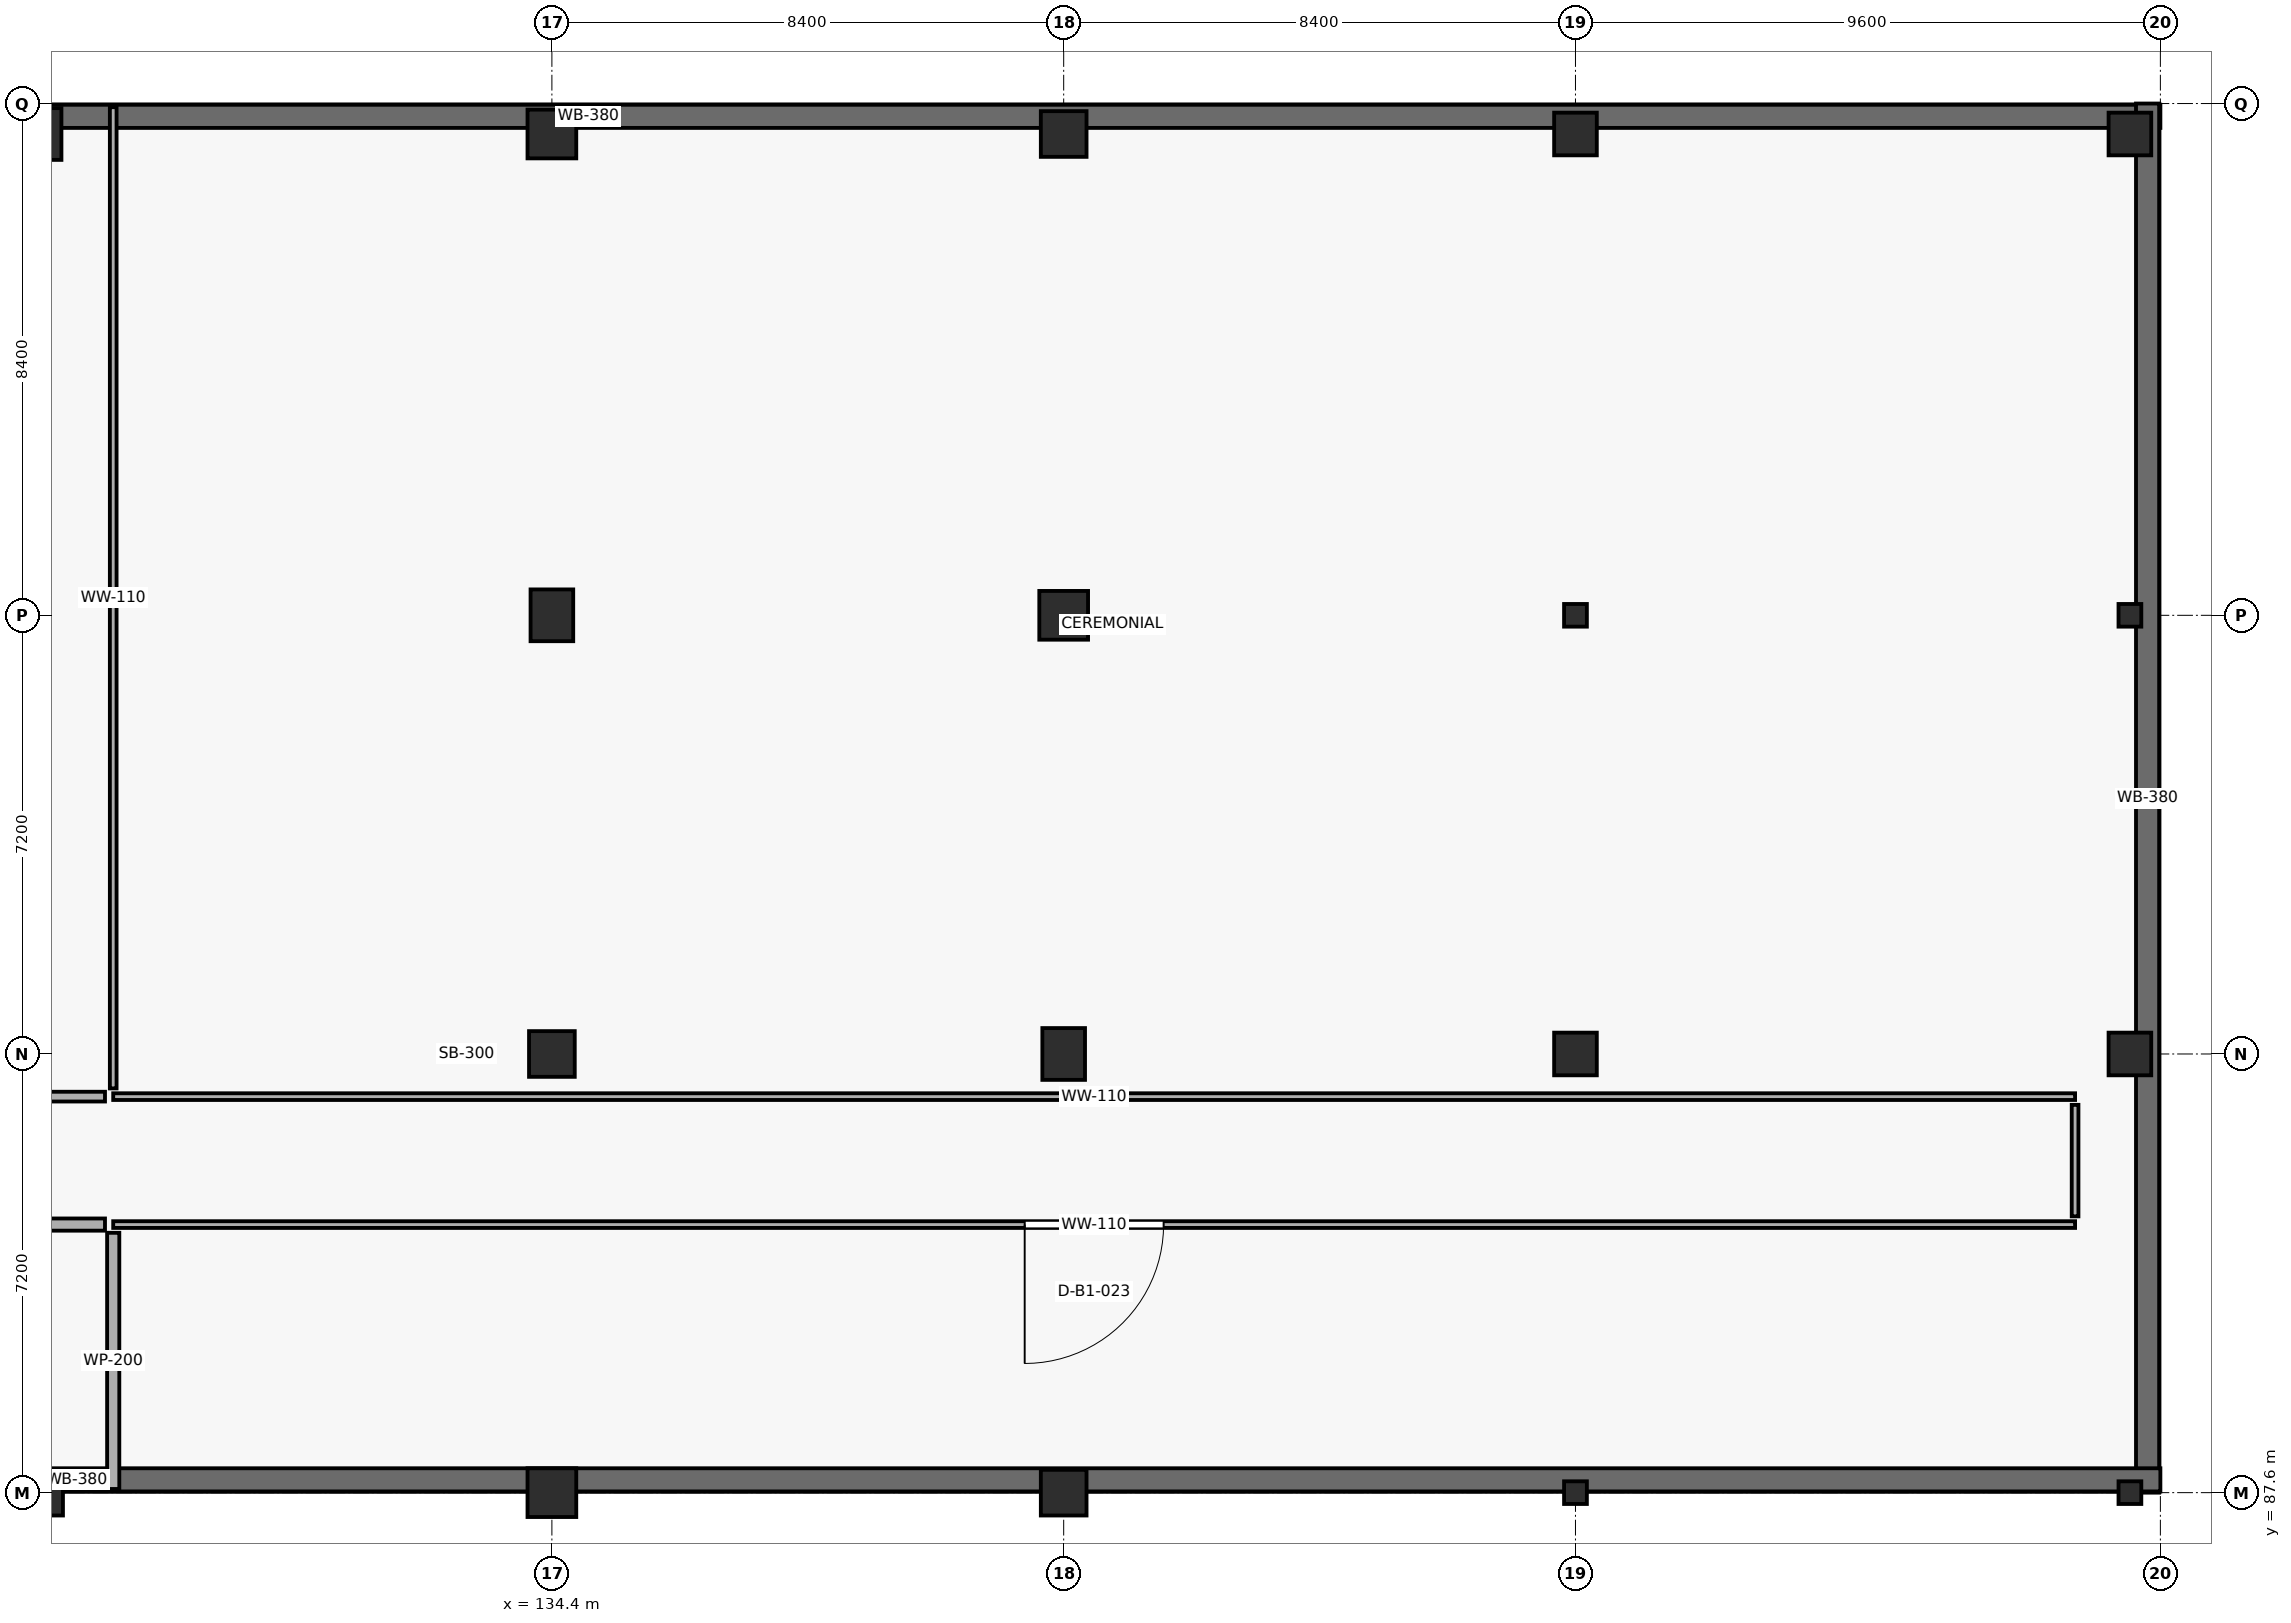
"""IFC4 building model, lengths in metres.
Left out: names, types, materials, properties, quantities, classifications, styles, units other than length and angle.
Written with IfcOpenShell. Run it as: python <this file> out.ifc"""

import sys

from ifc_helpers import new_model, si_unit, direction, frame, frame_2d, origin, origin_2d, place, context, subcontext, project, spatial, rectangle, i_section, extrude, element, fill, save


model = new_model("IFC4")
c1 = context("Model", 3, precision=1e-05, world=origin(), true_north=direction((0.0, 1.0)))
c2 = subcontext(c1, "Body", "Model", "MODEL_VIEW")
j1 = project(units=[si_unit("LENGTHUNIT", "METRE"), si_unit("PLANEANGLEUNIT", "RADIAN")], contexts=[c1])
p1 = place(None, origin())
s1 = spatial("IfcSite", under=j1, at=p1, CompositionType="ELEMENT")
p2 = place(p1, origin())
s2 = spatial("IfcBuilding", under=s1, at=p2, CompositionType="ELEMENT")
p3 = place(p2, frame((0.0, 0.0, -4.5)))
s3 = spatial("IfcBuildingStorey", under=s2, at=p3, CompositionType="ELEMENT", Elevation=-4.5)
p4 = place(p3, frame((126.0, 87.6, -0.3), z_axis=(0.0, 0.0, 1.0), x_axis=(1.0, 0.0, 0.0)))
e1 = element("IfcColumn", 1, at=p4, inside=s3, PredefinedType="COLUMN", context=c2, shape_type="SweptSolid", body=[
    extrude(rectangle(XDim=0.75, YDim=0.75, at=origin_2d()), origin(), (0.0, 0.0, 1.0), 4.8),
])
p5 = place(p3, frame((126.0, 109.9, -0.3), z_axis=(0.0, 0.0, 1.0), x_axis=(1.0, 0.0, 0.0)))
e2 = element("IfcColumn", 2, at=p5, inside=s3, PredefinedType="COLUMN", context=c2, shape_type="SweptSolid", body=[
    extrude(rectangle(XDim=0.7, YDim=0.85, at=origin_2d()), origin(), (0.0, 0.0, 1.0), 4.8),
])
p6 = place(p3, frame((134.4, 87.6, -0.3), z_axis=(0.0, 0.0, 1.0), x_axis=(1.0, 0.0, 0.0)))
e3 = element("IfcColumn", 3, at=p6, inside=s3, PredefinedType="COLUMN", context=c2, shape_type="SweptSolid", body=[
    extrude(rectangle(XDim=0.8, YDim=0.8, at=origin_2d()), origin(), (0.0, 0.0, 1.0), 4.8),
])
p7 = place(p3, frame((134.4, 94.8, -0.3), z_axis=(0.0, 0.0, 1.0), x_axis=(1.0, 0.0, 0.0)))
e4 = element("IfcColumn", 4, at=p7, inside=s3, PredefinedType="COLUMN", context=c2, shape_type="SweptSolid", body=[
    extrude(rectangle(XDim=0.75, YDim=0.75, at=origin_2d()), origin(), (0.0, 0.0, 1.0), 4.8),
])
p8 = place(p3, frame((134.4, 102.0, -0.3), z_axis=(0.0, 0.0, 1.0), x_axis=(1.0, 0.0, 0.0)))
e5 = element("IfcColumn", 5, at=p8, inside=s3, PredefinedType="COLUMN", context=c2, shape_type="SweptSolid", body=[
    extrude(rectangle(XDim=0.7, YDim=0.85, at=origin_2d()), origin(), (0.0, 0.0, 1.0), 4.8),
])
p9 = place(p3, frame((134.4, 109.9, -0.3), z_axis=(0.0, 0.0, 1.0), x_axis=(1.0, 0.0, 0.0)))
e6 = element("IfcColumn", 6, at=p9, inside=s3, PredefinedType="COLUMN", context=c2, shape_type="SweptSolid", body=[
    extrude(rectangle(XDim=0.8, YDim=0.8, at=origin_2d()), origin(), (0.0, 0.0, 1.0), 4.8),
])
p10 = place(p3, frame((142.8, 87.6, -0.3), z_axis=(0.0, 0.0, 1.0), x_axis=(1.0, 0.0, 0.0)))
e7 = element("IfcColumn", 7, at=p10, inside=s3, PredefinedType="COLUMN", context=c2, shape_type="SweptSolid", body=[
    extrude(rectangle(XDim=0.75, YDim=0.75, at=origin_2d()), origin(), (0.0, 0.0, 1.0), 4.8),
])
p11 = place(p3, frame((142.8, 94.8, -0.3), z_axis=(0.0, 0.0, 1.0), x_axis=(1.0, 0.0, 0.0)))
e8 = element("IfcColumn", 8, at=p11, inside=s3, PredefinedType="COLUMN", context=c2, shape_type="SweptSolid", body=[
    extrude(rectangle(XDim=0.7, YDim=0.85, at=origin_2d()), origin(), (0.0, 0.0, 1.0), 4.8),
])
p12 = place(p3, frame((142.8, 102.0, -0.3), z_axis=(0.0, 0.0, 1.0), x_axis=(1.0, 0.0, 0.0)))
e9 = element("IfcColumn", 9, at=p12, inside=s3, PredefinedType="COLUMN", context=c2, shape_type="SweptSolid", body=[
    extrude(rectangle(XDim=0.8, YDim=0.8, at=origin_2d()), origin(), (0.0, 0.0, 1.0), 4.8),
])
p13 = place(p3, frame((142.8, 109.9, -0.3), z_axis=(0.0, 0.0, 1.0), x_axis=(1.0, 0.0, 0.0)))
e10 = element("IfcColumn", 10, at=p13, inside=s3, PredefinedType="COLUMN", context=c2, shape_type="SweptSolid", body=[
    extrude(rectangle(XDim=0.75, YDim=0.75, at=origin_2d()), origin(), (0.0, 0.0, 1.0), 4.8),
])
p14 = place(p3, frame((151.2, 87.6, -0.3), z_axis=(0.0, 0.0, 1.0), x_axis=(1.0, 0.0, 0.0)))
e11 = element("IfcColumn", 11, at=p14, inside=s3, PredefinedType="COLUMN", context=c2, shape_type="SweptSolid", body=[
    extrude(i_section(OverallWidth=0.374, OverallDepth=0.372, WebThickness=0.016, FlangeThickness=0.026, at=origin_2d()), origin(), (0.0, 0.0, 1.0), 4.8),
])
p15 = place(p3, frame((151.2, 94.8, -0.3), z_axis=(0.0, 0.0, 1.0), x_axis=(1.0, 0.0, 0.0)))
e12 = element("IfcColumn", 12, at=p15, inside=s3, PredefinedType="COLUMN", context=c2, shape_type="SweptSolid", body=[
    extrude(rectangle(XDim=0.7, YDim=0.7, at=origin_2d()), origin(), (0.0, 0.0, 1.0), 4.8),
])
p16 = place(p3, frame((151.2, 102.0, -0.3), z_axis=(0.0, 0.0, 1.0), x_axis=(1.0, 0.0, 0.0)))
e13 = element("IfcColumn", 13, at=p16, inside=s3, PredefinedType="COLUMN", context=c2, shape_type="SweptSolid", body=[
    extrude(i_section(OverallWidth=0.374, OverallDepth=0.372, WebThickness=0.016, FlangeThickness=0.026, at=origin_2d()), origin(), (0.0, 0.0, 1.0), 4.8),
])
p17 = place(p3, frame((151.2, 109.9, -0.3), z_axis=(0.0, 0.0, 1.0), x_axis=(1.0, 0.0, 0.0)))
e14 = element("IfcColumn", 14, at=p17, inside=s3, PredefinedType="COLUMN", context=c2, shape_type="SweptSolid", body=[
    extrude(rectangle(XDim=0.7, YDim=0.7, at=origin_2d()), origin(), (0.0, 0.0, 1.0), 4.8),
])
p18 = place(p3, frame((160.3, 87.6, -0.3), z_axis=(0.0, 0.0, 1.0), x_axis=(1.0, 0.0, 0.0)))
e15 = element("IfcColumn", 15, at=p18, inside=s3, PredefinedType="COLUMN", context=c2, shape_type="SweptSolid", body=[
    extrude(i_section(OverallWidth=0.374, OverallDepth=0.372, WebThickness=0.016, FlangeThickness=0.026, at=origin_2d()), origin(), (0.0, 0.0, 1.0), 4.8),
])
p19 = place(p3, frame((160.3, 94.8, -0.3), z_axis=(0.0, 0.0, 1.0), x_axis=(1.0, 0.0, 0.0)))
e16 = element("IfcColumn", 16, at=p19, inside=s3, PredefinedType="COLUMN", context=c2, shape_type="SweptSolid", body=[
    extrude(rectangle(XDim=0.7, YDim=0.7, at=origin_2d()), origin(), (0.0, 0.0, 1.0), 4.8),
])
p20 = place(p3, frame((160.3, 102.0, -0.3), z_axis=(0.0, 0.0, 1.0), x_axis=(1.0, 0.0, 0.0)))
e17 = element("IfcColumn", 17, at=p20, inside=s3, PredefinedType="COLUMN", context=c2, shape_type="SweptSolid", body=[
    extrude(i_section(OverallWidth=0.374, OverallDepth=0.372, WebThickness=0.016, FlangeThickness=0.026, at=origin_2d()), origin(), (0.0, 0.0, 1.0), 4.8),
])
p21 = place(p3, frame((160.3, 109.9, -0.3), z_axis=(0.0, 0.0, 1.0), x_axis=(1.0, 0.0, 0.0)))
e18 = element("IfcColumn", 18, at=p21, inside=s3, PredefinedType="COLUMN", context=c2, shape_type="SweptSolid", body=[
    extrude(rectangle(XDim=0.7, YDim=0.7, at=origin_2d()), origin(), (0.0, 0.0, 1.0), 4.8),
])
p22 = place(p3, frame((109.2, 110.19, 0.0), z_axis=(0.0, 0.0, 1.0), x_axis=(1.0, 0.0, 0.0)))
e19 = element("IfcWall", 19, at=p22, inside=s3, PredefinedType="SOLIDWALL", context=c2, shape_type="SweptSolid", body=[
    extrude(rectangle(XDim=51.6, YDim=0.38, at=frame_2d((25.8, 0.0))), origin(), (0.0, 0.0, 1.0), 4.22),
])
p23 = place(p3, frame((160.59, 110.4, 0.0), z_axis=(0.0, 0.0, 1.0), x_axis=(0.0, -1.0, 0.0)))
e20 = element("IfcWall", 20, at=p23, inside=s3, PredefinedType="SOLIDWALL", context=c2, shape_type="SweptSolid", body=[
    extrude(rectangle(XDim=22.8, YDim=0.38, at=frame_2d((11.4, 0.0))), origin(), (0.0, 0.0, 1.0), 4.22),
])
p24 = place(p3, frame((160.8, 87.81, 0.0), z_axis=(0.0, 0.0, 1.0), x_axis=(-1.0, 0.0, 0.0)))
e21 = element("IfcWall", 21, at=p24, inside=s3, PredefinedType="SOLIDWALL", context=c2, shape_type="SweptSolid", body=[
    extrude(rectangle(XDim=68.4, YDim=0.38, at=frame_2d((34.2, 0.0))), origin(), (0.0, 0.0, 1.0), 4.22),
])
p25 = place(p3, frame((127.2, 92.0, 0.0), z_axis=(0.0, 0.0, 1.0), x_axis=(1.0, 0.0, 0.0)))
e22 = element("IfcWall", 22, at=p25, inside=s3, PredefinedType="PARTITIONING", context=c2, shape_type="SweptSolid", body=[
    extrude(rectangle(XDim=32.2, YDim=0.11, at=frame_2d((16.1, 0.0))), origin(), (0.0, 0.0, 1.0), 4.22),
])
p26 = place(p25, frame((14.96, 0.0, 0.0)))
e23 = element("IfcOpeningElement", 23, at=p26, cuts=e22, PredefinedType="OPENING", context=c2, shape_type="SweptSolid", body=[
    extrude(rectangle(XDim=2.28, YDim=2.75, at=frame_2d((1.14, 1.375))), frame((0.0, 0.065, 0.0), z_axis=(0.0, -1.0, 0.0), x_axis=(1.0, 0.0, 0.0)), (0.0, 0.0, 1.0), 0.13),
])
p27 = place(p3, frame((159.4, 94.1, 0.0), z_axis=(0.0, 0.0, 1.0), x_axis=(-1.0, 0.0, 0.0)))
e24 = element("IfcWall", 24, at=p27, inside=s3, PredefinedType="PARTITIONING", context=c2, shape_type="SweptSolid", body=[
    extrude(rectangle(XDim=32.2, YDim=0.11, at=frame_2d((16.1, 0.0))), origin(), (0.0, 0.0, 1.0), 4.22),
])
p28 = place(p3, frame((127.2, 94.235, 0.0), z_axis=(0.0, 0.0, 1.0), x_axis=(0.0, 1.0, 0.0)))
e25 = element("IfcWall", 25, at=p28, inside=s3, PredefinedType="PARTITIONING", context=c2, shape_type="SweptSolid", body=[
    extrude(rectangle(XDim=16.105, YDim=0.11, at=frame_2d((8.052, 0.0))), origin(), (0.0, 0.0, 1.0), 4.22),
])
p29 = place(p3, frame((122.5, 92.0, 0.0), z_axis=(0.0, 0.0, 1.0), x_axis=(1.0, 0.0, 0.0)))
e26 = element("IfcWall", 26, at=p29, inside=s3, PredefinedType="PARTITIONING", context=c2, shape_type="SweptSolid", body=[
    extrude(rectangle(XDim=4.565, YDim=0.2, at=frame_2d((2.282, 0.0))), origin(), (0.0, 0.0, 1.0), 4.22),
])
p30 = place(p3, frame((127.065, 94.1, 0.0), z_axis=(0.0, 0.0, 1.0), x_axis=(-1.0, 0.0, 0.0)))
e27 = element("IfcWall", 27, at=p30, inside=s3, PredefinedType="PARTITIONING", context=c2, shape_type="SweptSolid", body=[
    extrude(rectangle(XDim=4.405, YDim=0.16, at=frame_2d((2.203, 0.0))), origin(), (0.0, 0.0, 1.0), 4.22),
])
p31 = place(p3, frame((127.2, 91.865, 0.0), z_axis=(0.0, 0.0, 1.0), x_axis=(0.0, -1.0, 0.0)))
e28 = element("IfcWall", 28, at=p31, inside=s3, PredefinedType="PARTITIONING", context=c2, shape_type="SweptSolid", body=[
    extrude(rectangle(XDim=4.205, YDim=0.2, at=frame_2d((2.103, 0.0))), origin(), (0.0, 0.0, 1.0), 4.22),
])
p32 = place(p3, frame((159.4, 92.135, 0.0), z_axis=(0.0, 0.0, 1.0), x_axis=(0.0, 1.0, 0.0)))
e29 = element("IfcWall", 29, at=p32, inside=s3, PredefinedType="PARTITIONING", context=c2, shape_type="SweptSolid", body=[
    extrude(rectangle(XDim=1.83, YDim=0.11, at=frame_2d((0.915, 0.0))), origin(), (0.0, 0.0, 1.0), 4.22),
])
p33 = place(p26, origin())
e30 = element("IfcDoor", 30, at=p33, inside=s3, OperationType="SINGLE_SWING_RIGHT", PredefinedType="DOOR", context=c2, shape_type="SweptSolid", body=[
    extrude(rectangle(XDim=2.28, YDim=2.75, at=frame_2d((1.14, 1.375))), frame((0.0, 0.025, 0.0), z_axis=(0.0, -1.0, 0.0), x_axis=(1.0, 0.0, 0.0)), (0.0, 0.0, 1.0), 0.05),
])
fill(e23, e30)
save(model, sys.argv[1])
